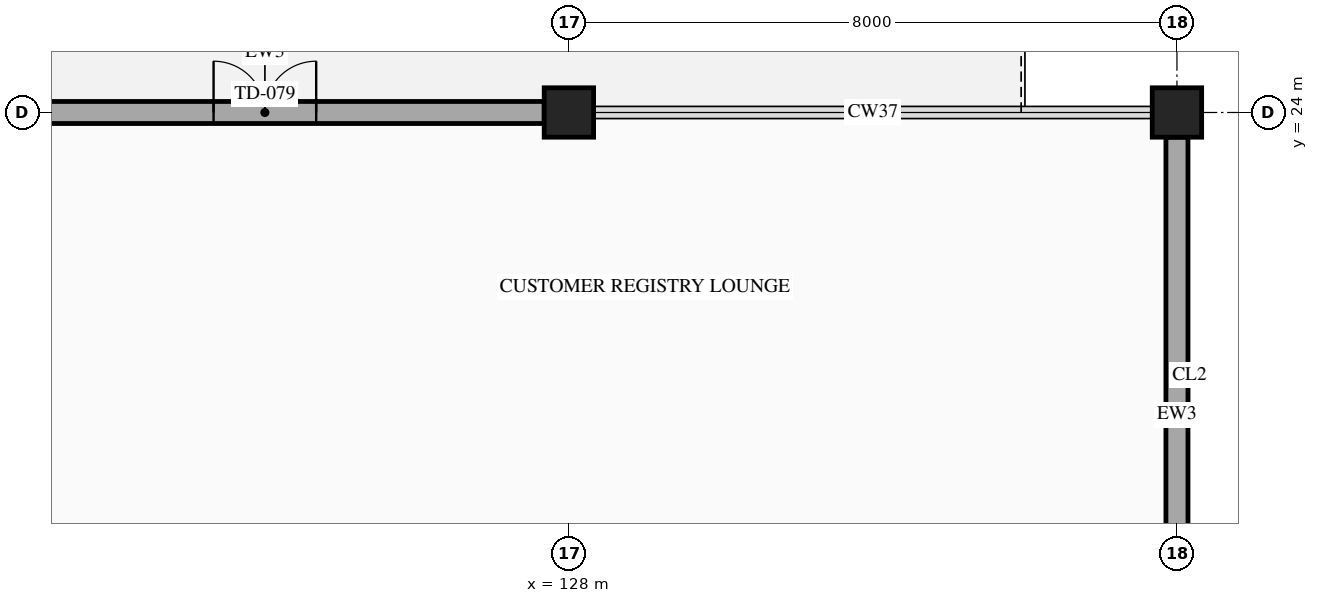
"""IFC4 building model, lengths in metres.
Left out: names, types, materials, properties, quantities, classifications, styles, units other than length and angle.
Written with IfcOpenShell. Run it as: python <this file> out.ifc"""

import sys

from ifc_helpers import new_model, si_unit, direction, frame, frame_2d, origin, origin_2d, place, context, subcontext, project, spatial, rectangle, extrude, element, fill, save


model = new_model("IFC4")
c1 = context("Model", 3, precision=1e-05, world=origin(), true_north=direction((0.0, 1.0)))
c2 = subcontext(c1, "Body", "Model", "MODEL_VIEW")
j1 = project(units=[si_unit("LENGTHUNIT", "METRE"), si_unit("PLANEANGLEUNIT", "RADIAN")], contexts=[c1])
p1 = place(None, origin())
s1 = spatial("IfcSite", under=j1, at=p1, CompositionType="ELEMENT")
p2 = place(p1, origin())
s2 = spatial("IfcBuilding", under=s1, at=p2, CompositionType="ELEMENT")
p3 = place(p2, frame((0.0, 0.0, 23.9)))
s3 = spatial("IfcBuildingStorey", under=s2, at=p3, CompositionType="ELEMENT", Elevation=23.9)
for number, where, z_axis, x_axis in (
    (1, (128.0, 24.0, 0.0), (0.0, 0.0, 1.0), (1.0, 0.0, 0.0)),
    (2, (136.0, 24.0, 0.0), (0.0, 0.0, 1.0), (1.0, 0.0, 0.0)),
):
    element("IfcColumn", number, at=place(p3, frame(where, z_axis=z_axis, x_axis=x_axis)), inside=s3, PredefinedType="COLUMN", context=c2, shape_type="SweptSolid", body=[
        extrude(rectangle(XDim=0.65, YDim=0.65, at=origin_2d()), origin(), (0.0, 0.0, 1.0), 4.5),
    ])
p4 = place(p3, frame((120.325, 24.0, 0.0), z_axis=(0.0, 0.0, 1.0), x_axis=(1.0, 0.0, 0.0)))
e3 = element("IfcWall", 3, at=p4, inside=s3, PredefinedType="STANDARD", context=c2, shape_type="SweptSolid", body=[
    extrude(rectangle(XDim=7.35, YDim=0.29, at=frame_2d((3.675, 0.0))), origin(), (0.0, 0.0, 1.0), 3.48),
])
p5 = place(p4, frame((3.0, 0.0, 0.0)))
e4 = element("IfcOpeningElement", 4, at=p5, cuts=e3, PredefinedType="OPENING", context=c2, shape_type="SweptSolid", body=[
    extrude(rectangle(XDim=1.35, YDim=2.1, at=frame_2d((0.675, 1.05))), frame((0.0, 0.155, 0.0), z_axis=(0.0, -1.0, 0.0), x_axis=(1.0, 0.0, 0.0)), (0.0, 0.0, 1.0), 0.31),
])
p6 = place(p3, frame((136.0, 23.675, 0.0), z_axis=(0.0, 0.0, 1.0), x_axis=(0.0, -1.0, 0.0)))
e5 = element("IfcWall", 5, at=p6, inside=s3, PredefinedType="STANDARD", context=c2, shape_type="SweptSolid", body=[
    extrude(rectangle(XDim=7.3, YDim=0.29, at=frame_2d((3.65, 0.0))), origin(), (0.0, 0.0, 1.0), 3.48),
])
p7 = place(p5, origin())
e6 = element("IfcDoor", 6, at=p7, inside=s3, OperationType="DOUBLE_DOOR_SINGLE_SWING", PredefinedType="DOOR", context=c2, shape_type="SweptSolid", body=[
    extrude(rectangle(XDim=1.35, YDim=2.1, at=frame_2d((0.675, 1.05))), frame((0.0, 0.025, 0.0), z_axis=(0.0, -1.0, 0.0), x_axis=(1.0, 0.0, 0.0)), (0.0, 0.0, 1.0), 0.05),
])
fill(e4, e6)
save(model, sys.argv[1])
